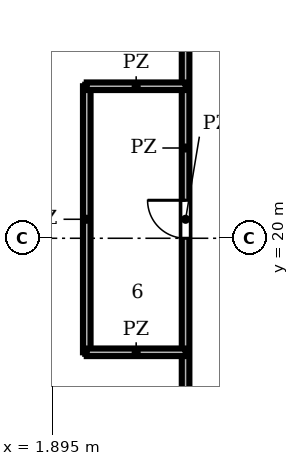
"""IFC4 building model, lengths in metres.
Left out: names, types, materials, properties, quantities, classifications, styles, units other than length and angle.
Written with IfcOpenShell. Run it as: python <this file> out.ifc"""

import sys

from ifc_helpers import new_model, si_unit, direction, frame, frame_2d, origin, place, context, subcontext, project, spatial, rectangle, extrude, element, fill, save


model = new_model("IFC4")
c1 = context("Model", 3, precision=1e-05, world=origin(), true_north=direction((0.0, 1.0)))
c2 = subcontext(c1, "Body", "Model", "MODEL_VIEW")
j1 = project(units=[si_unit("LENGTHUNIT", "METRE"), si_unit("PLANEANGLEUNIT", "RADIAN")], contexts=[c1])
p1 = place(None, origin())
s1 = spatial("IfcSite", under=j1, at=p1, CompositionType="ELEMENT")
p2 = place(p1, origin())
s2 = spatial("IfcBuilding", under=s1, at=p2, CompositionType="ELEMENT")
p3 = place(p2, frame((0.0, 0.0, 237.0)))
s3 = spatial("IfcBuildingStorey", under=s2, at=p3, CompositionType="ELEMENT", Elevation=237.0)
for number, where, z_axis, x_axis in (
    (1, (2.8, 17.0, 0.0), (0.0, 0.0, 1.0), (1.0, 0.0, 0.0)),
    (2, (2.8, 24.0, 0.0), (0.0, 0.0, 1.0), (1.0, 0.0, 0.0)),
):
    element("IfcWall", number, at=place(p3, frame(where, z_axis=z_axis, x_axis=x_axis)), inside=s3, PredefinedType="PARTITIONING", context=c2, shape_type="SweptSolid", body=[
        extrude(rectangle(XDim=2.6, YDim=0.2, at=frame_2d((1.3, 0.0))), origin(), (0.0, 0.0, 1.0), 8.55),
    ])
p4 = place(p3, frame((2.8, 17.0, 0.0), z_axis=(0.0, 0.0, 1.0), x_axis=(0.0, 1.0, 0.0)))
e3 = element("IfcWall", 3, at=p4, inside=s3, PredefinedType="PARTITIONING", context=c2, shape_type="SweptSolid", body=[
    extrude(rectangle(XDim=7.0, YDim=0.2, at=frame_2d((3.5, 0.0))), origin(), (0.0, 0.0, 1.0), 8.55),
])
p5 = place(p3, frame((5.4, 14.0, 0.0), z_axis=(0.0, 0.0, 1.0), x_axis=(0.0, 1.0, 0.0)))
e4 = element("IfcWall", 4, at=p5, inside=s3, PredefinedType="PARTITIONING", context=c2, shape_type="SweptSolid", body=[
    extrude(rectangle(XDim=16.75, YDim=0.2, at=frame_2d((8.375, 0.0))), origin(), (0.0, 0.0, 1.0), 8.55),
])
p6 = place(p5, frame((6.0, 0.0, 0.0)))
e5 = element("IfcOpeningElement", 5, at=p6, cuts=e4, PredefinedType="OPENING", context=c2, shape_type="SweptSolid", body=[
    extrude(rectangle(XDim=1.0, YDim=2.1, at=frame_2d((0.5, 1.05))), frame((0.0, 0.11, 0.0), z_axis=(0.0, -1.0, 0.0), x_axis=(1.0, 0.0, 0.0)), (0.0, 0.0, 1.0), 0.22),
])
p7 = place(p6, origin())
e6 = element("IfcDoor", 6, at=p7, inside=s3, OperationType="SINGLE_SWING_RIGHT", PredefinedType="DOOR", context=c2, shape_type="SweptSolid", body=[
    extrude(rectangle(XDim=1.0, YDim=2.1, at=frame_2d((0.5, 1.05))), frame((0.0, 0.025, 0.0), z_axis=(0.0, -1.0, 0.0), x_axis=(1.0, 0.0, 0.0)), (0.0, 0.0, 1.0), 0.05),
])
fill(e5, e6)
save(model, sys.argv[1])
